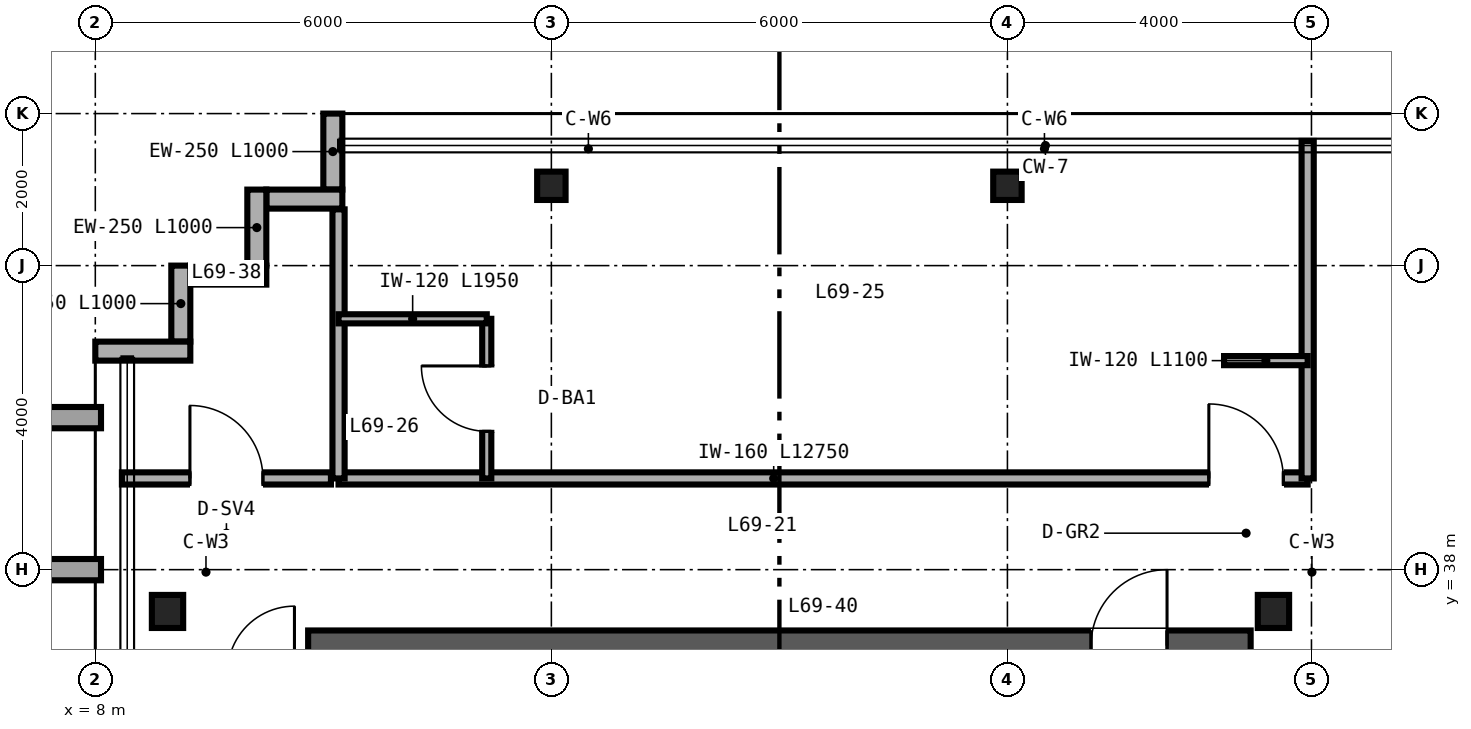
"""IFC4 building model, lengths in metres.
Left out: names, types, materials, properties, quantities, classifications, styles, units other than length and angle.
Written with IfcOpenShell. Run it as: python <this file> out.ifc"""

import sys

from ifc_helpers import new_model, si_unit, direction, frame, frame_2d, origin, origin_2d, place, context, subcontext, project, spatial, rectangle, i_section, extrude, source, transform, mapped, element, fill, save


model = new_model("IFC4")
c1 = context("Model", 3, precision=1e-05, world=origin(), true_north=direction((0.0, 1.0)))
c2 = subcontext(c1, "Body", "Model", "MODEL_VIEW")
j1 = project(units=[si_unit("LENGTHUNIT", "METRE"), si_unit("PLANEANGLEUNIT", "RADIAN")], contexts=[c1])
p1 = place(None, origin())
s1 = spatial("IfcSite", under=j1, at=p1, CompositionType="ELEMENT")
p2 = place(p1, origin())
s2 = spatial("IfcBuilding", under=s1, at=p2, CompositionType="ELEMENT")
p3 = place(p2, frame((0.0, 0.0, 272.4)))
s3 = spatial("IfcBuildingStorey", under=s2, at=p3, CompositionType="ELEMENT", Elevation=272.4)
p4 = place(p3, frame((10.8, 37.0, 0.0), z_axis=(0.0, 0.0, 1.0), x_axis=(1.0, 0.0, 0.0)))
e1 = element("IfcWall", 1, at=p4, inside=s3, PredefinedType="SHEAR", context=c2, shape_type="SweptSolid", body=[
    extrude(rectangle(XDim=12.4, YDim=0.4, at=frame_2d((6.2, 0.0))), origin(), (0.0, 0.0, 1.0), 3.38),
])
p5 = place(p4, frame((10.3, 0.0, 0.0)))
e2 = element("IfcOpeningElement", 2, at=p5, cuts=e1, PredefinedType="OPENING", context=c2, shape_type="SweptSolid", body=[
    extrude(rectangle(XDim=1.0, YDim=2.15, at=frame_2d((0.5, 1.075))), frame((0.0, 0.21, 0.0), z_axis=(0.0, -1.0, 0.0), x_axis=(1.0, 0.0, 0.0)), (0.0, 0.0, 1.0), 0.42),
])
m1 = source(origin(), c2, "Body", "SweptSolid", [
    extrude(i_section(OverallWidth=0.412, OverallDepth=0.435, WebThickness=0.036, FlangeThickness=0.057, FilletRadius=0.025, at=origin_2d()), origin(), (0.0, 0.0, 1.0), 3.38),
])
for number, where, z_axis, x_axis in (
    (3, (8.95, 37.45, 0.0), (0.0, 0.0, 1.0), (1.0, 0.0, 0.0)),
    (4, (23.5, 37.45, 0.0), (0.0, 0.0, 1.0), (1.0, 0.0, 0.0)),
):
    element("IfcColumn", number, at=place(p3, frame(where, z_axis=z_axis, x_axis=x_axis)), inside=s3, PredefinedType="COLUMN", context=c2, shape_type="MappedRepresentation", body=[
        mapped(m1, transform((0.0, 0.0, 0.0), scale=1.0)),
    ])
m2 = source(origin(), c2, "Body", "SweptSolid", [
    extrude(i_section(OverallWidth=0.374, OverallDepth=0.373, WebThickness=0.016, FlangeThickness=0.026, FilletRadius=0.025, at=origin_2d()), origin(), (0.0, 0.0, 1.0), 3.38),
])
for number, where, z_axis, x_axis in (
    (5, (14.0, 43.05, 0.0), (0.0, 0.0, 1.0), (1.0, 0.0, 0.0)),
    (6, (20.0, 43.05, 0.0), (0.0, 0.0, 1.0), (1.0, 0.0, 0.0)),
):
    element("IfcColumn", number, at=place(p3, frame(where, z_axis=z_axis, x_axis=x_axis)), inside=s3, PredefinedType="COLUMN", context=c2, shape_type="MappedRepresentation", body=[
        mapped(m2, transform((0.0, 0.0, 0.0), scale=1.0)),
    ])
for number, where, z_axis, x_axis in (
    (7, (11.125, 44.0, 0.0), (0.0, 0.0, 1.0), (0.0, -1.0, 0.0)),
    (8, (11.25, 42.875, 0.0), (0.0, 0.0, 1.0), (-1.0, 0.0, 0.0)),
    (9, (10.125, 43.0, 0.0), (0.0, 0.0, 1.0), (0.0, -1.0, 0.0)),
    (10, (10.25, 41.875, 0.0), (0.0, 0.0, 1.0), (-1.0, 0.0, 0.0)),
    (11, (9.125, 42.0, 0.0), (0.0, 0.0, 1.0), (0.0, -1.0, 0.0)),
):
    element("IfcWall", number, at=place(p3, frame(where, z_axis=z_axis, x_axis=x_axis)), inside=s3, PredefinedType="SOLIDWALL", context=c2, shape_type="SweptSolid", body=[
        extrude(rectangle(XDim=1.0, YDim=0.25, at=frame_2d((0.5, 0.0))), origin(), (0.0, 0.0, 1.0), 3.38),
    ])
p6 = place(p3, frame((9.25, 40.875, 0.0), z_axis=(0.0, 0.0, 1.0), x_axis=(-1.0, 0.0, 0.0)))
e12 = element("IfcWall", 12, at=p6, inside=s3, PredefinedType="SOLIDWALL", context=c2, shape_type="SweptSolid", body=[
    extrude(rectangle(XDim=1.25, YDim=0.25, at=frame_2d((0.625, 0.0))), origin(), (0.0, 0.0, 1.0), 3.38),
])
p7 = place(p3, frame((11.2, 39.2, 0.0), z_axis=(0.0, 0.0, 1.0), x_axis=(1.0, 0.0, 0.0)))
e13 = element("IfcWall", 13, at=p7, inside=s3, PredefinedType="PARTITIONING", context=c2, shape_type="SweptSolid", body=[
    extrude(rectangle(XDim=12.75, YDim=0.16, at=frame_2d((6.375, 0.0))), origin(), (0.0, 0.0, 1.0), 3.38),
])
p8 = place(p7, frame((11.45, 0.0, 0.0)))
e14 = element("IfcOpeningElement", 14, at=p8, cuts=e13, PredefinedType="OPENING", context=c2, shape_type="SweptSolid", body=[
    extrude(rectangle(XDim=0.98, YDim=2.2, at=frame_2d((0.49, 1.1))), frame((0.0, 0.09, 0.0), z_axis=(0.0, -1.0, 0.0), x_axis=(1.0, 0.0, 0.0)), (0.0, 0.0, 1.0), 0.18),
])
p9 = place(p3, frame((11.2, 39.2, 0.0), z_axis=(0.0, 0.0, 1.0), x_axis=(0.0, 1.0, 0.0)))
e15 = element("IfcWall", 15, at=p9, inside=s3, PredefinedType="PARTITIONING", context=c2, shape_type="SweptSolid", body=[
    extrude(rectangle(XDim=3.54, YDim=0.16, at=frame_2d((1.77, 0.0))), origin(), (0.0, 0.0, 1.0), 3.38),
])
p10 = place(p3, frame((23.95, 39.2, 0.0), z_axis=(0.0, 0.0, 1.0), x_axis=(0.0, 1.0, 0.0)))
e16 = element("IfcWall", 16, at=p10, inside=s3, PredefinedType="PARTITIONING", context=c2, shape_type="SweptSolid", body=[
    extrude(rectangle(XDim=4.44, YDim=0.16, at=frame_2d((2.22, 0.0))), origin(), (0.0, 0.0, 1.0), 3.38),
])
p11 = place(p3, frame((13.15, 39.2, 0.0), z_axis=(0.0, 0.0, 1.0), x_axis=(0.0, 1.0, 0.0)))
e17 = element("IfcWall", 17, at=p11, inside=s3, PredefinedType="PARTITIONING", context=c2, shape_type="SweptSolid", body=[
    extrude(rectangle(XDim=2.1, YDim=0.12, at=frame_2d((1.05, 0.0))), origin(), (0.0, 0.0, 1.0), 3.38),
])
p12 = place(p11, frame((0.62, 0.0, 0.0)))
e18 = element("IfcOpeningElement", 18, at=p12, cuts=e17, PredefinedType="OPENING", context=c2, shape_type="SweptSolid", body=[
    extrude(rectangle(XDim=0.86, YDim=2.1, at=frame_2d((0.43, 1.05))), frame((0.0, 0.07, 0.0), z_axis=(0.0, -1.0, 0.0), x_axis=(1.0, 0.0, 0.0)), (0.0, 0.0, 1.0), 0.14),
])
p13 = place(p3, frame((11.2, 41.3, 0.0), z_axis=(0.0, 0.0, 1.0), x_axis=(1.0, 0.0, 0.0)))
e19 = element("IfcWall", 19, at=p13, inside=s3, PredefinedType="PARTITIONING", context=c2, shape_type="SweptSolid", body=[
    extrude(rectangle(XDim=1.95, YDim=0.12, at=frame_2d((0.975, 0.0))), origin(), (0.0, 0.0, 1.0), 3.38),
])
p14 = place(p3, frame((22.85, 40.75, 0.0), z_axis=(0.0, 0.0, 1.0), x_axis=(1.0, 0.0, 0.0)))
e20 = element("IfcWall", 20, at=p14, inside=s3, PredefinedType="PARTITIONING", context=c2, shape_type="SweptSolid", body=[
    extrude(rectangle(XDim=1.1, YDim=0.12, at=frame_2d((0.55, 0.0))), origin(), (0.0, 0.0, 1.0), 3.38),
])
p15 = place(p3, frame((8.35, 39.2, 0.0), z_axis=(0.0, 0.0, 1.0), x_axis=(1.0, 0.0, 0.0)))
e21 = element("IfcWall", 21, at=p15, inside=s3, PredefinedType="PARTITIONING", context=c2, shape_type="SweptSolid", body=[
    extrude(rectangle(XDim=2.75, YDim=0.16, at=frame_2d((1.375, 0.0))), origin(), (0.0, 0.0, 1.0), 3.38),
])
p16 = place(p15, frame((0.895, 0.0, 0.0)))
e22 = element("IfcOpeningElement", 22, at=p16, cuts=e21, PredefinedType="OPENING", context=c2, shape_type="SweptSolid", body=[
    extrude(rectangle(XDim=0.96, YDim=2.15, at=frame_2d((0.48, 1.075))), frame((0.0, 0.09, 0.0), z_axis=(0.0, -1.0, 0.0), x_axis=(1.0, 0.0, 0.0)), (0.0, 0.0, 1.0), 0.18),
])
m3 = source(origin(), c2, "Body", "SweptSolid", [
    extrude(rectangle(XDim=1.0, YDim=2.15, at=frame_2d((0.5, 1.075))), frame((0.0, 0.025, 0.0), z_axis=(0.0, -1.0, 0.0), x_axis=(1.0, 0.0, 0.0)), (0.0, 0.0, 1.0), 0.05),
])
p17 = place(p5, origin())
e23 = element("IfcDoor", 23, at=p17, inside=s3, OperationType="SINGLE_SWING_RIGHT", PredefinedType="DOOR", context=c2, shape_type="MappedRepresentation", body=[
    mapped(m3, transform((0.0, 0.0, 0.0), scale=1.0)),
])
fill(e2, e23)
m4 = source(origin(), c2, "Body", "SweptSolid", [
    extrude(rectangle(XDim=0.86, YDim=2.1, at=frame_2d((0.43, 1.05))), frame((0.0, 0.025, 0.0), z_axis=(0.0, -1.0, 0.0), x_axis=(1.0, 0.0, 0.0)), (0.0, 0.0, 1.0), 0.05),
])
p18 = place(p12, origin())
e24 = element("IfcDoor", 24, at=p18, inside=s3, OperationType="SINGLE_SWING_RIGHT", PredefinedType="DOOR", context=c2, shape_type="MappedRepresentation", body=[
    mapped(m4, transform((0.0, 0.0, 0.0), scale=1.0)),
])
fill(e18, e24)
m5 = source(origin(), c2, "Body", "SweptSolid", [
    extrude(rectangle(XDim=0.98, YDim=2.2, at=frame_2d((0.49, 1.1))), frame((0.0, 0.025, 0.0), z_axis=(0.0, -1.0, 0.0), x_axis=(1.0, 0.0, 0.0)), (0.0, 0.0, 1.0), 0.05),
])
p19 = place(p8, origin())
e25 = element("IfcDoor", 25, at=p19, inside=s3, OperationType="SINGLE_SWING_LEFT", PredefinedType="DOOR", context=c2, shape_type="MappedRepresentation", body=[
    mapped(m5, transform((0.0, 0.0, 0.0), scale=1.0)),
])
fill(e14, e25)
m6 = source(origin(), c2, "Body", "SweptSolid", [
    extrude(rectangle(XDim=0.96, YDim=2.15, at=frame_2d((0.48, 1.075))), frame((0.0, 0.025, 0.0), z_axis=(0.0, -1.0, 0.0), x_axis=(1.0, 0.0, 0.0)), (0.0, 0.0, 1.0), 0.05),
])
p20 = place(p16, origin())
e26 = element("IfcDoor", 26, at=p20, inside=s3, OperationType="SINGLE_SWING_LEFT", PredefinedType="DOOR", context=c2, shape_type="MappedRepresentation", body=[
    mapped(m6, transform((0.0, 0.0, 0.0), scale=1.0)),
])
fill(e22, e26)
save(model, sys.argv[1])
